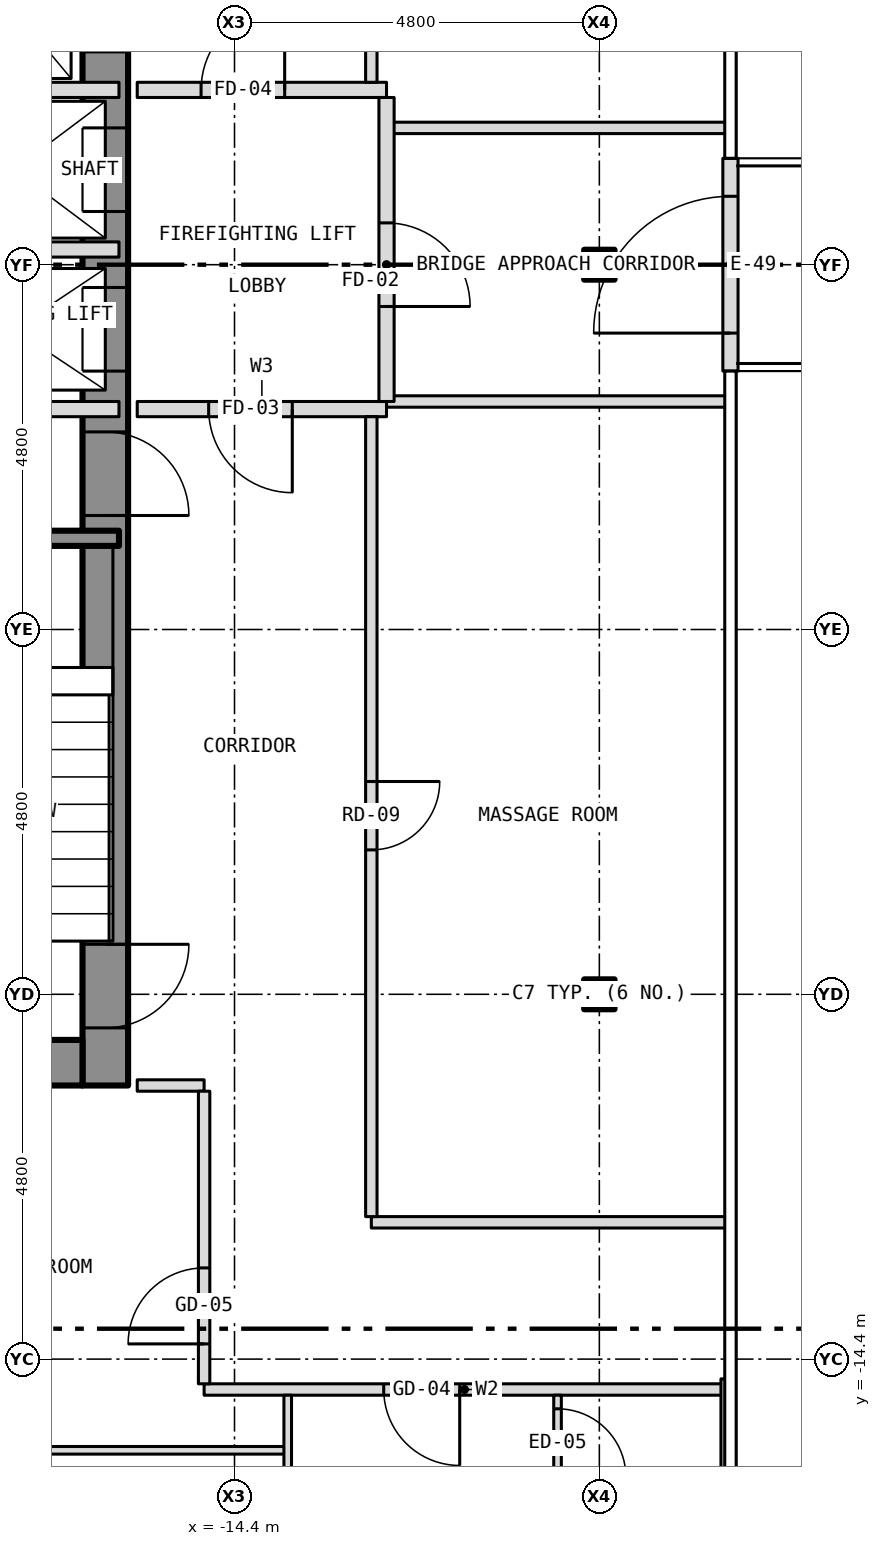
"""IFC4 building model, lengths in metres.
Left out: names, types, materials, properties, quantities, classifications, styles, units other than length and angle.
Written with IfcOpenShell. Run it as: python <this file> out.ifc"""

import sys

from ifc_helpers import new_model, si_unit, direction, frame, frame_2d, origin, origin_2d, place, context, subcontext, project, spatial, rectangle, i_section, extrude, element, fill, save


model = new_model("IFC4")
c1 = context("Model", 3, precision=1e-05, world=origin(), true_north=direction((0.0, 1.0)))
c2 = subcontext(c1, "Body", "Model", "MODEL_VIEW")
j1 = project(units=[si_unit("LENGTHUNIT", "METRE"), si_unit("PLANEANGLEUNIT", "RADIAN")], contexts=[c1])
p1 = place(None, origin())
s1 = spatial("IfcSite", under=j1, at=p1, CompositionType="ELEMENT")
p2 = place(p1, origin())
s2 = spatial("IfcBuilding", under=s1, at=p2, CompositionType="ELEMENT")
p3 = place(p2, frame((0.0, 0.0, 124.0)))
s3 = spatial("IfcBuildingStorey", under=s2, at=p3, CompositionType="ELEMENT", Elevation=124.0)
for number, where, z_axis, x_axis in (
    (1, (-9.6, -9.6, -0.15), (0.0, 0.0, 1.0), (1.0, 0.0, 0.0)),
    (2, (-9.6, 0.0, -0.15), (0.0, 0.0, 1.0), (1.0, 0.0, 0.0)),
):
    element("IfcColumn", number, at=place(p3, frame(where, z_axis=z_axis, x_axis=x_axis)), inside=s3, PredefinedType="COLUMN", context=c2, shape_type="SweptSolid", body=[
        extrude(i_section(OverallWidth=0.399, OverallDepth=0.394, WebThickness=0.023, FlangeThickness=0.037, at=origin_2d()), origin(), (0.0, 0.0, 1.0), 3.5),
    ])
p4 = place(p3, frame((-16.1, -10.8, 0.0), z_axis=(0.0, 0.0, 1.0), x_axis=(0.0, 1.0, 0.0)))
e3 = element("IfcWall", 3, at=p4, inside=s3, PredefinedType="SHEAR", context=c2, shape_type="SweptSolid", body=[
    extrude(rectangle(XDim=21.6, YDim=0.6, at=frame_2d((10.8, 0.0))), origin(), (0.0, 0.0, 1.0), 3.25),
])
p5 = place(p4, frame((9.4, 0.0, 0.0)))
e4 = element("IfcOpeningElement", 4, at=p5, cuts=e3, PredefinedType="OPENING", context=c2, shape_type="SweptSolid", body=[
    extrude(rectangle(XDim=1.1, YDim=2.1, at=frame_2d((0.55, 1.05))), frame((0.0, 0.312, 0.0), z_axis=(0.0, -1.0, 0.0), x_axis=(1.0, 0.0, 0.0)), (0.0, 0.0, 1.0), 0.624),
])
p6 = place(p4, frame((11.5, 0.0, 0.0)))
e5 = element("IfcOpeningElement", 5, at=p6, cuts=e3, PredefinedType="OPENING", context=c2, shape_type="SweptSolid", body=[
    extrude(rectangle(XDim=1.1, YDim=2.1, at=frame_2d((0.55, 1.05))), frame((0.0, 0.312, 0.0), z_axis=(0.0, -1.0, 0.0), x_axis=(1.0, 0.0, 0.0)), (0.0, 0.0, 1.0), 0.624),
])
p7 = place(p4, frame((13.6, 0.0, 0.0)))
e6 = element("IfcOpeningElement", 6, at=p7, cuts=e3, PredefinedType="OPENING", context=c2, shape_type="SweptSolid", body=[
    extrude(rectangle(XDim=1.1, YDim=2.1, at=frame_2d((0.55, 1.05))), frame((0.0, 0.312, 0.0), z_axis=(0.0, -1.0, 0.0), x_axis=(1.0, 0.0, 0.0)), (0.0, 0.0, 1.0), 0.624),
])
p8 = place(p4, frame((15.7, 0.0, 0.0)))
e7 = element("IfcOpeningElement", 7, at=p8, cuts=e3, PredefinedType="OPENING", context=c2, shape_type="SweptSolid", body=[
    extrude(rectangle(XDim=1.1, YDim=2.1, at=frame_2d((0.55, 1.05))), frame((0.0, 0.312, 0.0), z_axis=(0.0, -1.0, 0.0), x_axis=(1.0, 0.0, 0.0)), (0.0, 0.0, 1.0), 0.624),
])
p9 = place(p4, frame((17.8, 0.0, 0.0)))
e8 = element("IfcOpeningElement", 8, at=p9, cuts=e3, PredefinedType="OPENING", context=c2, shape_type="SweptSolid", body=[
    extrude(rectangle(XDim=1.1, YDim=2.1, at=frame_2d((0.55, 1.05))), frame((0.0, 0.312, 0.0), z_axis=(0.0, -1.0, 0.0), x_axis=(1.0, 0.0, 0.0)), (0.0, 0.0, 1.0), 0.624),
])
p10 = place(p4, frame((0.758, 0.0, 0.0)))
e9 = element("IfcOpeningElement", 9, at=p10, cuts=e3, PredefinedType="OPENING", context=c2, shape_type="SweptSolid", body=[
    extrude(rectangle(XDim=1.1, YDim=2.1, at=frame_2d((0.55, 1.05))), frame((0.0, 0.312, 0.0), z_axis=(0.0, -1.0, 0.0), x_axis=(1.0, 0.0, 0.0)), (0.0, 0.0, 1.0), 0.624),
])
p11 = place(p4, frame((7.5, 0.0, 0.0)))
e10 = element("IfcOpeningElement", 10, at=p11, cuts=e3, PredefinedType="OPENING", context=c2, shape_type="SweptSolid", body=[
    extrude(rectangle(XDim=1.1, YDim=2.1, at=frame_2d((0.55, 1.05))), frame((0.0, 0.312, 0.0), z_axis=(0.0, -1.0, 0.0), x_axis=(1.0, 0.0, 0.0)), (0.0, 0.0, 1.0), 0.624),
])
p12 = place(p3, frame((-22.2, -10.5, 0.0), z_axis=(0.0, 0.0, 1.0), x_axis=(1.0, 0.0, 0.0)))
e11 = element("IfcWall", 11, at=p12, inside=s3, PredefinedType="SHEAR", context=c2, shape_type="SweptSolid", body=[
    extrude(rectangle(XDim=5.8, YDim=0.6, at=frame_2d((2.9, 0.0))), origin(), (0.0, 0.0, 1.0), 3.25),
])
p13 = place(p3, frame((-7.875, -1.4, 0.0), z_axis=(0.0, 0.0, 1.0), x_axis=(0.0, 1.0, 0.0)))
e12 = element("IfcWall", 12, at=p13, inside=s3, PredefinedType="SOLIDWALL", context=c2, shape_type="SweptSolid", body=[
    extrude(rectangle(XDim=2.8, YDim=0.2, at=frame_2d((1.4, 0.0))), origin(), (0.0, 0.0, 1.0), 3.5),
])
p14 = place(p13, frame((0.5, 0.0, 0.0)))
e13 = element("IfcOpeningElement", 13, at=p14, cuts=e12, PredefinedType="OPENING", context=c2, shape_type="SweptSolid", body=[
    extrude(rectangle(XDim=1.8, YDim=2.1, at=frame_2d((0.9, 1.05))), frame((0.0, 0.112, 0.0), z_axis=(0.0, -1.0, 0.0), x_axis=(1.0, 0.0, 0.0)), (0.0, 0.0, 1.0), 0.224),
])
p15 = place(p3, frame((-23.28, -15.6, 0.0), z_axis=(0.0, 0.0, 1.0), x_axis=(1.0, 0.0, 0.0)))
e14 = element("IfcWall", 14, at=p15, inside=s3, PredefinedType="PARTITIONING", context=c2, shape_type="SweptSolid", body=[
    extrude(rectangle(XDim=9.58, YDim=0.1, at=frame_2d((4.79, 0.0))), origin(), (0.0, 0.0, 1.0), 3.35),
])
p16 = place(p15, frame((4.568, 0.0, 0.0)))
e15 = element("IfcOpeningElement", 15, at=p16, cuts=e14, PredefinedType="OPENING", context=c2, shape_type="SweptSolid", body=[
    extrude(rectangle(XDim=0.9, YDim=2.1, at=frame_2d((0.45, 1.05))), frame((0.0, 0.062, 0.0), z_axis=(0.0, -1.0, 0.0), x_axis=(1.0, 0.0, 0.0)), (0.0, 0.0, 1.0), 0.124),
])
p17 = place(p3, frame((-14.8, -14.8, 0.0), z_axis=(0.0, 0.0, 1.0), x_axis=(1.0, 0.0, 0.0)))
e16 = element("IfcWall", 16, at=p17, inside=s3, PredefinedType="PARTITIONING", context=c2, shape_type="SweptSolid", body=[
    extrude(rectangle(XDim=6.85, YDim=0.15, at=frame_2d((3.425, 0.0))), origin(), (0.0, 0.0, 1.0), 3.35),
])
p18 = place(p17, frame((2.363, 0.0, 0.0)))
e17 = element("IfcOpeningElement", 17, at=p18, cuts=e16, PredefinedType="OPENING", context=c2, shape_type="SweptSolid", body=[
    extrude(rectangle(XDim=1.0, YDim=2.1, at=frame_2d((0.5, 1.05))), frame((0.0, 0.087, 0.0), z_axis=(0.0, -1.0, 0.0), x_axis=(1.0, 0.0, 0.0)), (0.0, 0.0, 1.0), 0.174),
])
p19 = place(p3, frame((-12.6, -12.6, 0.0), z_axis=(0.0, 0.0, 1.0), x_axis=(1.0, 0.0, 0.0)))
e18 = element("IfcWall", 18, at=p19, inside=s3, PredefinedType="PARTITIONING", context=c2, shape_type="SweptSolid", body=[
    extrude(rectangle(XDim=4.68, YDim=0.15, at=frame_2d((2.34, 0.0))), origin(), (0.0, 0.0, 1.0), 3.35),
])
p20 = place(p3, frame((-15.68, -10.8, 0.0), z_axis=(0.0, 0.0, 1.0), x_axis=(1.0, 0.0, 0.0)))
e19 = element("IfcWall", 19, at=p20, inside=s3, PredefinedType="PARTITIONING", context=c2, shape_type="SweptSolid", body=[
    extrude(rectangle(XDim=0.88, YDim=0.15, at=frame_2d((0.44, 0.0))), origin(), (0.0, 0.0, 1.0), 3.35),
])
p21 = place(p3, frame((-20.0, -3.6, 0.0), z_axis=(0.0, 0.0, 1.0), x_axis=(1.0, 0.0, 0.0)))
e20 = element("IfcWall", 20, at=p21, inside=s3, PredefinedType="SHEAR", context=c2, shape_type="SweptSolid", body=[
    extrude(rectangle(XDim=4.08, YDim=0.2, at=frame_2d((2.04, 0.0))), origin(), (0.0, 0.0, 1.0), 3.25),
])
p22 = place(p3, frame((-22.68, -1.9, 0.0), z_axis=(0.0, 0.0, 1.0), x_axis=(1.0, 0.0, 0.0)))
e21 = element("IfcWall", 21, at=p22, inside=s3, PredefinedType="PARTITIONING", context=c2, shape_type="SweptSolid", body=[
    extrude(rectangle(XDim=6.76, YDim=0.2, at=frame_2d((3.38, 0.0))), origin(), (0.0, 0.0, 1.0), 3.25),
])
p23 = place(p3, frame((-15.68, -1.9, 0.0), z_axis=(0.0, 0.0, 1.0), x_axis=(1.0, 0.0, 0.0)))
e22 = element("IfcWall", 22, at=p23, inside=s3, PredefinedType="PARTITIONING", context=c2, shape_type="SweptSolid", body=[
    extrude(rectangle(XDim=3.28, YDim=0.2, at=frame_2d((1.64, 0.0))), origin(), (0.0, 0.0, 1.0), 3.35),
])
p24 = place(p23, frame((0.94, 0.0, 0.0)))
e23 = element("IfcOpeningElement", 23, at=p24, cuts=e22, PredefinedType="OPENING", context=c2, shape_type="SweptSolid", body=[
    extrude(rectangle(XDim=1.1, YDim=2.1, at=frame_2d((0.55, 1.05))), frame((0.0, 0.112, 0.0), z_axis=(0.0, -1.0, 0.0), x_axis=(1.0, 0.0, 0.0)), (0.0, 0.0, 1.0), 0.224),
])
p25 = place(p3, frame((-12.4, -1.8, 0.0), z_axis=(0.0, 0.0, 1.0), x_axis=(1.0, 0.0, 0.0)))
e24 = element("IfcWall", 24, at=p25, inside=s3, PredefinedType="PARTITIONING", context=c2, shape_type="SweptSolid", body=[
    extrude(rectangle(XDim=4.48, YDim=0.15, at=frame_2d((2.24, 0.0))), origin(), (0.0, 0.0, 1.0), 3.35),
])
p26 = place(p3, frame((-18.8, 0.2, 0.0), z_axis=(0.0, 0.0, 1.0), x_axis=(1.0, 0.0, 0.0)))
e25 = element("IfcWall", 25, at=p26, inside=s3, PredefinedType="PARTITIONING", context=c2, shape_type="SweptSolid", body=[
    extrude(rectangle(XDim=2.88, YDim=0.2, at=frame_2d((1.44, 0.0))), origin(), (0.0, 0.0, 1.0), 3.25),
])
p27 = place(p3, frame((-12.4, 1.8, 0.0), z_axis=(0.0, 0.0, 1.0), x_axis=(1.0, 0.0, 0.0)))
e26 = element("IfcWall", 26, at=p27, inside=s3, PredefinedType="PARTITIONING", context=c2, shape_type="SweptSolid", body=[
    extrude(rectangle(XDim=4.48, YDim=0.15, at=frame_2d((2.24, 0.0))), origin(), (0.0, 0.0, 1.0), 3.35),
])
p28 = place(p3, frame((-18.8, 2.3, 0.0), z_axis=(0.0, 0.0, 1.0), x_axis=(1.0, 0.0, 0.0)))
e27 = element("IfcWall", 27, at=p28, inside=s3, PredefinedType="PARTITIONING", context=c2, shape_type="SweptSolid", body=[
    extrude(rectangle(XDim=2.88, YDim=0.2, at=frame_2d((1.44, 0.0))), origin(), (0.0, 0.0, 1.0), 3.25),
])
p29 = place(p3, frame((-15.68, 2.3, 0.0), z_axis=(0.0, 0.0, 1.0), x_axis=(1.0, 0.0, 0.0)))
e28 = element("IfcWall", 28, at=p29, inside=s3, PredefinedType="PARTITIONING", context=c2, shape_type="SweptSolid", body=[
    extrude(rectangle(XDim=3.28, YDim=0.2, at=frame_2d((1.64, 0.0))), origin(), (0.0, 0.0, 1.0), 3.35),
])
p30 = place(p29, frame((0.84, 0.0, 0.0)))
e29 = element("IfcOpeningElement", 29, at=p30, cuts=e28, PredefinedType="OPENING", context=c2, shape_type="SweptSolid", body=[
    extrude(rectangle(XDim=1.1, YDim=2.1, at=frame_2d((0.55, 1.05))), frame((0.0, 0.112, 0.0), z_axis=(0.0, -1.0, 0.0), x_axis=(1.0, 0.0, 0.0)), (0.0, 0.0, 1.0), 0.224),
])
p31 = place(p3, frame((-14.8, -14.725, 0.0), z_axis=(0.0, 0.0, 1.0), x_axis=(0.0, 1.0, 0.0)))
e30 = element("IfcWall", 30, at=p31, inside=s3, PredefinedType="PARTITIONING", context=c2, shape_type="SweptSolid", body=[
    extrude(rectangle(XDim=3.85, YDim=0.15, at=frame_2d((1.925, 0.0))), origin(), (0.0, 0.0, 1.0), 3.35),
])
p32 = place(p31, frame((0.525, 0.0, 0.0)))
e31 = element("IfcOpeningElement", 31, at=p32, cuts=e30, PredefinedType="OPENING", context=c2, shape_type="SweptSolid", body=[
    extrude(rectangle(XDim=1.0, YDim=2.1, at=frame_2d((0.5, 1.05))), frame((0.0, 0.087, 0.0), z_axis=(0.0, -1.0, 0.0), x_axis=(1.0, 0.0, 0.0)), (0.0, 0.0, 1.0), 0.174),
])
p33 = place(p3, frame((-13.7, -22.68, 0.0), z_axis=(0.0, 0.0, 1.0), x_axis=(0.0, 1.0, 0.0)))
e32 = element("IfcWall", 32, at=p33, inside=s3, PredefinedType="PARTITIONING", context=c2, shape_type="SweptSolid", body=[
    extrude(rectangle(XDim=7.805, YDim=0.1, at=frame_2d((3.902, 0.0))), origin(), (0.0, 0.0, 1.0), 3.35),
])
p34 = place(p3, frame((-12.6, -12.525, 0.0), z_axis=(0.0, 0.0, 1.0), x_axis=(0.0, 1.0, 0.0)))
e33 = element("IfcWall", 33, at=p34, inside=s3, PredefinedType="PARTITIONING", context=c2, shape_type="SweptSolid", body=[
    extrude(rectangle(XDim=10.525, YDim=0.15, at=frame_2d((5.262, 0.0))), origin(), (0.0, 0.0, 1.0), 3.35),
])
p35 = place(p34, frame((4.825, 0.0, 0.0)))
e34 = element("IfcOpeningElement", 34, at=p35, cuts=e33, PredefinedType="OPENING", context=c2, shape_type="SweptSolid", body=[
    extrude(rectangle(XDim=0.9, YDim=2.1, at=frame_2d((0.45, 1.05))), frame((0.0, 0.087, 0.0), z_axis=(0.0, -1.0, 0.0), x_axis=(1.0, 0.0, 0.0)), (0.0, 0.0, 1.0), 0.174),
])
p36 = place(p3, frame((-12.6, 2.4, 0.0), z_axis=(0.0, 0.0, 1.0), x_axis=(0.0, 1.0, 0.0)))
e35 = element("IfcWall", 35, at=p36, inside=s3, PredefinedType="PARTITIONING", context=c2, shape_type="SweptSolid", body=[
    extrude(rectangle(XDim=3.425, YDim=0.15, at=frame_2d((1.712, 0.0))), origin(), (0.0, 0.0, 1.0), 3.35),
])
p37 = place(p3, frame((-12.4, -1.8, 0.0), z_axis=(0.0, 0.0, 1.0), x_axis=(0.0, 1.0, 0.0)))
e36 = element("IfcWall", 36, at=p37, inside=s3, PredefinedType="PARTITIONING", context=c2, shape_type="SweptSolid", body=[
    extrude(rectangle(XDim=4.0, YDim=0.2, at=frame_2d((2.0, 0.0))), origin(), (0.0, 0.0, 1.0), 3.35),
])
p38 = place(p37, frame((1.25, 0.0, 0.0)))
e37 = element("IfcOpeningElement", 37, at=p38, cuts=e36, PredefinedType="OPENING", context=c2, shape_type="SweptSolid", body=[
    extrude(rectangle(XDim=1.1, YDim=2.1, at=frame_2d((0.55, 1.05))), frame((0.0, 0.112, 0.0), z_axis=(0.0, -1.0, 0.0), x_axis=(1.0, 0.0, 0.0)), (0.0, 0.0, 1.0), 0.224),
])
p39 = place(p3, frame((-10.15, -17.95, 0.0), z_axis=(0.0, 0.0, 1.0), x_axis=(0.0, 1.0, 0.0)))
e38 = element("IfcWall", 38, at=p39, inside=s3, PredefinedType="PARTITIONING", context=c2, shape_type="SweptSolid", body=[
    extrude(rectangle(XDim=3.075, YDim=0.1, at=frame_2d((1.538, 0.0))), origin(), (0.0, 0.0, 1.0), 3.35),
])
p40 = place(p39, frame((1.996, 0.0, 0.0)))
e39 = element("IfcOpeningElement", 39, at=p40, cuts=e38, PredefinedType="OPENING", context=c2, shape_type="SweptSolid", body=[
    extrude(rectangle(XDim=0.9, YDim=2.1, at=frame_2d((0.45, 1.05))), frame((0.0, 0.062, 0.0), z_axis=(0.0, -1.0, 0.0), x_axis=(1.0, 0.0, 0.0)), (0.0, 0.0, 1.0), 0.124),
])
p41 = place(p3, frame((-7.95, -18.14, 0.0), z_axis=(0.0, 0.0, 1.0), x_axis=(0.0, 1.0, 0.0)))
e40 = element("IfcWall", 40, at=p41, inside=s3, PredefinedType="PARTITIONING", context=c2, shape_type="SweptSolid", body=[
    extrude(rectangle(XDim=3.48, YDim=0.1, at=frame_2d((1.74, 0.0))), origin(), (0.0, 0.0, 1.0), 2.733),
])
p42 = place(p14, origin())
e41 = element("IfcDoor", 41, at=p42, inside=s3, OperationType="DOUBLE_DOOR_DOUBLE_SWING", PredefinedType="DOOR", context=c2, shape_type="SweptSolid", body=[
    extrude(rectangle(XDim=1.8, YDim=2.1, at=frame_2d((0.9, 1.05))), frame((0.0, 0.025, 0.0), z_axis=(0.0, -1.0, 0.0), x_axis=(1.0, 0.0, 0.0)), (0.0, 0.0, 1.0), 0.05),
])
fill(e13, e41)
p43 = place(p5, origin())
e42 = element("IfcDoor", 42, at=p43, inside=s3, OperationType="SLIDING_TO_LEFT", PredefinedType="DOOR", context=c2, shape_type="SweptSolid", body=[
    extrude(rectangle(XDim=1.1, YDim=2.1, at=frame_2d((0.55, 1.05))), frame((0.0, 0.025, 0.0), z_axis=(0.0, -1.0, 0.0), x_axis=(1.0, 0.0, 0.0)), (0.0, 0.0, 1.0), 0.05),
])
fill(e4, e42)
p44 = place(p6, origin())
e43 = element("IfcDoor", 43, at=p44, inside=s3, OperationType="SLIDING_TO_LEFT", PredefinedType="DOOR", context=c2, shape_type="SweptSolid", body=[
    extrude(rectangle(XDim=1.1, YDim=2.1, at=frame_2d((0.55, 1.05))), frame((0.0, 0.025, 0.0), z_axis=(0.0, -1.0, 0.0), x_axis=(1.0, 0.0, 0.0)), (0.0, 0.0, 1.0), 0.05),
])
fill(e5, e43)
p45 = place(p10, origin())
e44 = element("IfcDoor", 44, at=p45, inside=s3, OperationType="SINGLE_SWING_RIGHT", PredefinedType="DOOR", context=c2, shape_type="SweptSolid", body=[
    extrude(rectangle(XDim=1.1, YDim=2.1, at=frame_2d((0.55, 1.05))), frame((0.0, 0.025, 0.0), z_axis=(0.0, -1.0, 0.0), x_axis=(1.0, 0.0, 0.0)), (0.0, 0.0, 1.0), 0.05),
])
fill(e9, e44)
p46 = place(p11, origin())
e45 = element("IfcDoor", 45, at=p46, inside=s3, OperationType="SINGLE_SWING_LEFT", PredefinedType="DOOR", context=c2, shape_type="SweptSolid", body=[
    extrude(rectangle(XDim=1.1, YDim=2.1, at=frame_2d((0.55, 1.05))), frame((0.0, 0.025, 0.0), z_axis=(0.0, -1.0, 0.0), x_axis=(1.0, 0.0, 0.0)), (0.0, 0.0, 1.0), 0.05),
])
fill(e10, e45)
p47 = place(p38, origin())
e46 = element("IfcDoor", 46, at=p47, inside=s3, OperationType="SINGLE_SWING_LEFT", PredefinedType="DOOR", context=c2, shape_type="SweptSolid", body=[
    extrude(rectangle(XDim=1.1, YDim=2.1, at=frame_2d((0.55, 1.05))), frame((0.0, 0.025, 0.0), z_axis=(0.0, -1.0, 0.0), x_axis=(1.0, 0.0, 0.0)), (0.0, 0.0, 1.0), 0.05),
])
fill(e37, e46)
p48 = place(p24, origin())
e47 = element("IfcDoor", 47, at=p48, inside=s3, OperationType="SINGLE_SWING_RIGHT", PredefinedType="DOOR", context=c2, shape_type="SweptSolid", body=[
    extrude(rectangle(XDim=1.1, YDim=2.1, at=frame_2d((0.55, 1.05))), frame((0.0, 0.025, 0.0), z_axis=(0.0, -1.0, 0.0), x_axis=(1.0, 0.0, 0.0)), (0.0, 0.0, 1.0), 0.05),
])
fill(e23, e47)
p49 = place(p30, origin())
e48 = element("IfcDoor", 48, at=p49, inside=s3, OperationType="SINGLE_SWING_RIGHT", PredefinedType="DOOR", context=c2, shape_type="SweptSolid", body=[
    extrude(rectangle(XDim=1.1, YDim=2.1, at=frame_2d((0.55, 1.05))), frame((0.0, 0.025, 0.0), z_axis=(0.0, -1.0, 0.0), x_axis=(1.0, 0.0, 0.0)), (0.0, 0.0, 1.0), 0.05),
])
fill(e29, e48)
p50 = place(p18, origin())
e49 = element("IfcDoor", 49, at=p50, inside=s3, OperationType="SINGLE_SWING_RIGHT", PredefinedType="DOOR", context=c2, shape_type="SweptSolid", body=[
    extrude(rectangle(XDim=1.0, YDim=2.1, at=frame_2d((0.5, 1.05))), frame((0.0, 0.025, 0.0), z_axis=(0.0, -1.0, 0.0), x_axis=(1.0, 0.0, 0.0)), (0.0, 0.0, 1.0), 0.05),
])
fill(e17, e49)
p51 = place(p40, origin())
e50 = element("IfcDoor", 50, at=p51, inside=s3, OperationType="SINGLE_SWING_LEFT", PredefinedType="DOOR", context=c2, shape_type="SweptSolid", body=[
    extrude(rectangle(XDim=0.9, YDim=2.1, at=frame_2d((0.45, 1.05))), frame((0.0, 0.025, 0.0), z_axis=(0.0, -1.0, 0.0), x_axis=(1.0, 0.0, 0.0)), (0.0, 0.0, 1.0), 0.05),
])
fill(e39, e50)
p52 = place(p32, origin())
e51 = element("IfcDoor", 51, at=p52, inside=s3, OperationType="SINGLE_SWING_LEFT", PredefinedType="DOOR", context=c2, shape_type="SweptSolid", body=[
    extrude(rectangle(XDim=1.0, YDim=2.1, at=frame_2d((0.5, 1.05))), frame((0.0, 0.025, 0.0), z_axis=(0.0, -1.0, 0.0), x_axis=(1.0, 0.0, 0.0)), (0.0, 0.0, 1.0), 0.05),
])
fill(e31, e51)
p53 = place(p35, origin())
e52 = element("IfcDoor", 52, at=p53, inside=s3, OperationType="SINGLE_SWING_RIGHT", PredefinedType="DOOR", context=c2, shape_type="SweptSolid", body=[
    extrude(rectangle(XDim=0.9, YDim=2.1, at=frame_2d((0.45, 1.05))), frame((0.0, 0.025, 0.0), z_axis=(0.0, -1.0, 0.0), x_axis=(1.0, 0.0, 0.0)), (0.0, 0.0, 1.0), 0.05),
])
fill(e34, e52)
save(model, sys.argv[1])
